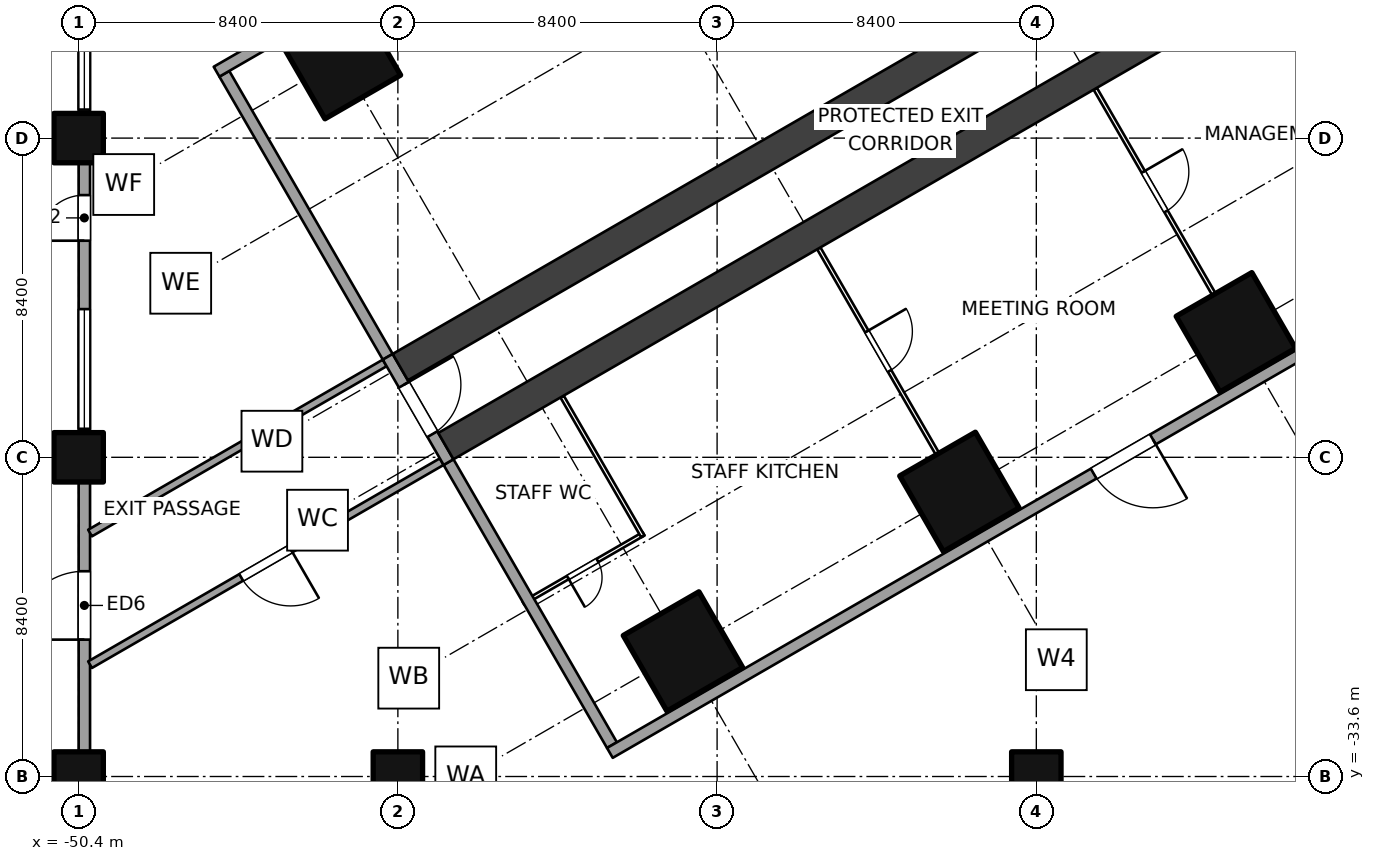
"""IFC4 building model, lengths in metres.
Left out: names, types, materials, properties, quantities, classifications, styles, units other than length and angle.
Written with IfcOpenShell. Run it as: python <this file> out.ifc"""

import sys

from ifc_helpers import new_model, si_unit, direction, frame, frame_2d, origin, origin_2d, place, context, subcontext, project, spatial, rectangle, extrude, element, fill, save


model = new_model("IFC4")
c1 = context("Model", 3, precision=1e-05, world=origin(), true_north=direction((0.0, 1.0)))
c2 = subcontext(c1, "Body", "Model", "MODEL_VIEW")
j1 = project(units=[si_unit("LENGTHUNIT", "METRE"), si_unit("PLANEANGLEUNIT", "RADIAN")], contexts=[c1])
p1 = place(None, origin())
s1 = spatial("IfcSite", under=j1, at=p1, CompositionType="ELEMENT")
p2 = place(p1, origin())
s2 = spatial("IfcBuilding", under=s1, at=p2, CompositionType="ELEMENT")
p3 = place(p2, origin())
s3 = spatial("IfcBuildingStorey", under=s2, at=p3, CompositionType="ELEMENT", Elevation=0.0)
for number, where, z_axis, x_axis in (
    (1, (-19.949, -21.91, 0.0), (0.0, 0.0, 1.0), (-0.5, 0.866, 0.0)),
    (2, (-27.224, -26.11, 0.0), (0.0, 0.0, 1.0), (-0.5, 0.866, 0.0)),
    (3, (-34.499, -30.31, 0.0), (0.0, 0.0, 1.0), (-0.5, 0.866, 0.0)),
    (4, (-43.499, -14.721, 0.0), (0.0, 0.0, 1.0), (-0.5, 0.866, 0.0)),
):
    element("IfcColumn", number, at=place(p3, frame(where, z_axis=z_axis, x_axis=x_axis)), inside=s3, PredefinedType="COLUMN", context=c2, shape_type="SweptSolid", body=[
        extrude(rectangle(XDim=2.3, YDim=2.3, at=origin_2d()), origin(), (0.0, 0.0, 1.0), 6.0),
    ])
for number, where, z_axis, x_axis in (
    (5, (-50.4, -33.6, 0.0), (0.0, 0.0, 1.0), (1.0, 0.0, 0.0)),
    (6, (-50.4, -25.2, 0.0), (0.0, 0.0, 1.0), (1.0, 0.0, 0.0)),
    (7, (-50.4, -16.8, 0.0), (0.0, 0.0, 1.0), (1.0, 0.0, 0.0)),
    (8, (-42.0, -33.6, 0.0), (0.0, 0.0, 1.0), (1.0, 0.0, 0.0)),
    (9, (-25.2, -33.6, 0.0), (0.0, 0.0, 1.0), (1.0, 0.0, 0.0)),
):
    element("IfcColumn", number, at=place(p3, frame(where, z_axis=z_axis, x_axis=x_axis)), inside=s3, PredefinedType="COLUMN", context=c2, shape_type="SweptSolid", body=[
        extrude(rectangle(XDim=1.3, YDim=1.3, at=origin_2d()), origin(), (0.0, 0.0, 1.0), 6.0),
    ])
p4 = place(p3, frame((-8.91, -6.53, 0.0), z_axis=(0.0, 0.0, 1.0), x_axis=(-0.866025284237, -0.500000207062, 0.0)))
e10 = element("IfcWall", 10, at=p4, inside=s3, PredefinedType="SHEAR", context=c2, shape_type="SweptSolid", body=[
    extrude(rectangle(XDim=36.75, YDim=0.8, at=frame_2d((18.375, 0.0))), origin(), (0.0, 0.0, 1.0), 6.0),
])
p5 = place(p4, frame((2.85, 0.0, 0.0)))
e11 = element("IfcOpeningElement", 11, at=p5, cuts=e10, PredefinedType="OPENING", context=c2, shape_type="SweptSolid", body=[
    extrude(rectangle(XDim=1.2, YDim=2.1, at=frame_2d((0.6, 1.05))), frame((0.0, 0.41, 0.0), z_axis=(0.0, -1.0, 0.0), x_axis=(1.0, 0.0, 0.0)), (0.0, 0.0, 1.0), 0.82),
])
p6 = place(p3, frame((-10.11, -4.451, 0.0), z_axis=(0.0, 0.0, 1.0), x_axis=(-0.866025284237, -0.500000207062, 0.0)))
e12 = element("IfcWall", 12, at=p6, inside=s3, PredefinedType="SHEAR", context=c2, shape_type="SweptSolid", body=[
    extrude(rectangle(XDim=36.75, YDim=0.8, at=frame_2d((18.375, 0.0))), origin(), (0.0, 0.0, 1.0), 6.0),
])
p7 = place(p6, frame((10.0, 0.0, 0.0)))
e13 = element("IfcOpeningElement", 13, at=p7, cuts=e12, PredefinedType="OPENING", context=c2, shape_type="SweptSolid", body=[
    extrude(rectangle(XDim=1.0, YDim=2.1, at=frame_2d((0.5, 1.05))), frame((0.0, 0.41, 0.0), z_axis=(0.0, -1.0, 0.0), x_axis=(1.0, 0.0, 0.0)), (0.0, 0.0, 1.0), 0.82),
])
p8 = place(p6, frame((2.85, 0.0, 0.0)))
e14 = element("IfcOpeningElement", 14, at=p8, cuts=e12, PredefinedType="OPENING", context=c2, shape_type="SweptSolid", body=[
    extrude(rectangle(XDim=1.2, YDim=2.1, at=frame_2d((0.6, 1.05))), frame((0.0, 0.41, 0.0), z_axis=(0.0, -1.0, 0.0), x_axis=(1.0, 0.0, 0.0)), (0.0, 0.0, 1.0), 0.82),
])
p9 = place(p3, frame((-50.25, -41.7, 0.0), z_axis=(0.0, 0.0, 1.0), x_axis=(0.0, 1.0, 0.0)))
e15 = element("IfcWall", 15, at=p9, inside=s3, PredefinedType="SOLIDWALL", context=c2, shape_type="SweptSolid", body=[
    extrude(rectangle(XDim=91.8, YDim=0.3, at=frame_2d((45.9, 0.0))), origin(), (0.0, 0.0, 1.0), 4.7),
])
p10 = place(p9, frame((11.702, 0.0, 0.0)))
e16 = element("IfcOpeningElement", 16, at=p10, cuts=e15, PredefinedType="OPENING", context=c2, shape_type="SweptSolid", body=[
    extrude(rectangle(XDim=1.8, YDim=2.4, at=frame_2d((0.9, 1.2))), frame((0.0, 0.16, 0.0), z_axis=(0.0, -1.0, 0.0), x_axis=(1.0, 0.0, 0.0)), (0.0, 0.0, 1.0), 0.32),
])
p11 = place(p9, frame((22.2, 0.0, 0.0)))
e17 = element("IfcOpeningElement", 17, at=p11, cuts=e15, PredefinedType="OPENING", context=c2, shape_type="SweptSolid", body=[
    extrude(rectangle(XDim=1.2, YDim=2.4, at=frame_2d((0.6, 1.2))), frame((0.0, 0.16, 0.0), z_axis=(0.0, -1.0, 0.0), x_axis=(1.0, 0.0, 0.0)), (0.0, 0.0, 1.0), 0.32),
])
p12 = place(p9, frame((36.6, 0.0, 0.0)))
e18 = element("IfcOpeningElement", 18, at=p12, cuts=e15, PredefinedType="OPENING", context=c2, shape_type="SweptSolid", body=[
    extrude(rectangle(XDim=1.8, YDim=2.4, at=frame_2d((0.9, 1.2))), frame((0.0, 0.16, 0.0), z_axis=(0.0, -1.0, 0.0), x_axis=(1.0, 0.0, 0.0)), (0.0, 0.0, 1.0), 0.32),
])
p13 = place(p9, frame((45.0, 0.0, 0.0)))
e19 = element("IfcOpeningElement", 19, at=p13, cuts=e15, PredefinedType="OPENING", context=c2, shape_type="SweptSolid", body=[
    extrude(rectangle(XDim=1.8, YDim=2.4, at=frame_2d((0.9, 1.2))), frame((0.0, 0.16, 0.0), z_axis=(0.0, -1.0, 0.0), x_axis=(1.0, 0.0, 0.0)), (0.0, 0.0, 1.0), 0.32),
])
p14 = place(p9, frame((53.4, 0.0, 0.0)))
e20 = element("IfcOpeningElement", 20, at=p14, cuts=e15, PredefinedType="OPENING", context=c2, shape_type="SweptSolid", body=[
    extrude(rectangle(XDim=1.8, YDim=2.4, at=frame_2d((0.9, 1.2))), frame((0.0, 0.16, 0.0), z_axis=(0.0, -1.0, 0.0), x_axis=(1.0, 0.0, 0.0)), (0.0, 0.0, 1.0), 0.32),
])
p15 = place(p9, frame((70.2, 0.0, 0.0)))
e21 = element("IfcOpeningElement", 21, at=p15, cuts=e15, PredefinedType="OPENING", context=c2, shape_type="SweptSolid", body=[
    extrude(rectangle(XDim=1.8, YDim=2.4, at=frame_2d((0.9, 1.2))), frame((0.0, 0.16, 0.0), z_axis=(0.0, -1.0, 0.0), x_axis=(1.0, 0.0, 0.0)), (0.0, 0.0, 1.0), 0.32),
])
p16 = place(p9, frame((78.6, 0.0, 0.0)))
e22 = element("IfcOpeningElement", 22, at=p16, cuts=e15, PredefinedType="OPENING", context=c2, shape_type="SweptSolid", body=[
    extrude(rectangle(XDim=1.8, YDim=2.4, at=frame_2d((0.9, 1.2))), frame((0.0, 0.16, 0.0), z_axis=(0.0, -1.0, 0.0), x_axis=(1.0, 0.0, 0.0)), (0.0, 0.0, 1.0), 0.32),
])
p17 = place(p9, frame((0.45, 0.0, 0.3)))
e23 = element("IfcOpeningElement", 23, at=p17, cuts=e15, PredefinedType="OPENING", context=c2, shape_type="SweptSolid", body=[
    extrude(rectangle(XDim=3.15, YDim=3.0, at=frame_2d((1.575, 1.5))), frame((0.0, 0.16, 0.0), z_axis=(0.0, -1.0, 0.0), x_axis=(1.0, 0.0, 0.0)), (0.0, 0.0, 1.0), 0.32),
])
p18 = place(p9, frame((4.2, 0.0, 0.3)))
e24 = element("IfcOpeningElement", 24, at=p18, cuts=e15, PredefinedType="OPENING", context=c2, shape_type="SweptSolid", body=[
    extrude(rectangle(XDim=3.15, YDim=3.0, at=frame_2d((1.575, 1.5))), frame((0.0, 0.16, 0.0), z_axis=(0.0, -1.0, 0.0), x_axis=(1.0, 0.0, 0.0)), (0.0, 0.0, 1.0), 0.32),
])
p19 = place(p9, frame((17.25, 0.0, 0.3)))
e25 = element("IfcOpeningElement", 25, at=p19, cuts=e15, PredefinedType="OPENING", context=c2, shape_type="SweptSolid", body=[
    extrude(rectangle(XDim=3.15, YDim=3.0, at=frame_2d((1.575, 1.5))), frame((0.0, 0.16, 0.0), z_axis=(0.0, -1.0, 0.0), x_axis=(1.0, 0.0, 0.0)), (0.0, 0.0, 1.0), 0.32),
])
p20 = place(p9, frame((25.65, 0.0, 0.3)))
e26 = element("IfcOpeningElement", 26, at=p20, cuts=e15, PredefinedType="OPENING", context=c2, shape_type="SweptSolid", body=[
    extrude(rectangle(XDim=3.15, YDim=3.0, at=frame_2d((1.575, 1.5))), frame((0.0, 0.16, 0.0), z_axis=(0.0, -1.0, 0.0), x_axis=(1.0, 0.0, 0.0)), (0.0, 0.0, 1.0), 0.32),
])
p21 = place(p9, frame((29.4, 0.0, 0.3)))
e27 = element("IfcOpeningElement", 27, at=p21, cuts=e15, PredefinedType="OPENING", context=c2, shape_type="SweptSolid", body=[
    extrude(rectangle(XDim=3.15, YDim=3.0, at=frame_2d((1.575, 1.5))), frame((0.0, 0.16, 0.0), z_axis=(0.0, -1.0, 0.0), x_axis=(1.0, 0.0, 0.0)), (0.0, 0.0, 1.0), 0.32),
])
p22 = place(p9, frame((59.25, 0.0, 0.3)))
e28 = element("IfcOpeningElement", 28, at=p22, cuts=e15, PredefinedType="OPENING", context=c2, shape_type="SweptSolid", body=[
    extrude(rectangle(XDim=3.15, YDim=3.0, at=frame_2d((1.575, 1.5))), frame((0.0, 0.16, 0.0), z_axis=(0.0, -1.0, 0.0), x_axis=(1.0, 0.0, 0.0)), (0.0, 0.0, 1.0), 0.32),
])
p23 = place(p9, frame((63.0, 0.0, 0.3)))
e29 = element("IfcOpeningElement", 29, at=p23, cuts=e15, PredefinedType="OPENING", context=c2, shape_type="SweptSolid", body=[
    extrude(rectangle(XDim=3.15, YDim=3.0, at=frame_2d((1.575, 1.5))), frame((0.0, 0.16, 0.0), z_axis=(0.0, -1.0, 0.0), x_axis=(1.0, 0.0, 0.0)), (0.0, 0.0, 1.0), 0.32),
])
p24 = place(p9, frame((84.45, 0.0, 0.3)))
e30 = element("IfcOpeningElement", 30, at=p24, cuts=e15, PredefinedType="OPENING", context=c2, shape_type="SweptSolid", body=[
    extrude(rectangle(XDim=3.15, YDim=3.0, at=frame_2d((1.575, 1.5))), frame((0.0, 0.16, 0.0), z_axis=(0.0, -1.0, 0.0), x_axis=(1.0, 0.0, 0.0)), (0.0, 0.0, 1.0), 0.32),
])
p25 = place(p9, frame((88.2, 0.0, 0.3)))
e31 = element("IfcOpeningElement", 31, at=p25, cuts=e15, PredefinedType="OPENING", context=c2, shape_type="SweptSolid", body=[
    extrude(rectangle(XDim=3.15, YDim=3.0, at=frame_2d((1.575, 1.5))), frame((0.0, 0.16, 0.0), z_axis=(0.0, -1.0, 0.0), x_axis=(1.0, 0.0, 0.0)), (0.0, 0.0, 1.0), 0.32),
])
p26 = place(p3, frame((-23.649, -15.501, 0.0), z_axis=(0.0, 0.0, 1.0), x_axis=(0.500004234368, -0.866022959057, 0.0)))
e32 = element("IfcWall", 32, at=p26, inside=s3, PredefinedType="PARTITIONING", context=c2, shape_type="SweptSolid", body=[
    extrude(rectangle(XDim=6.25, YDim=0.1, at=frame_2d((3.125, 0.0))), origin(), (0.0, 0.0, 1.0), 3.9),
])
p27 = place(p26, frame((2.525, 0.0, 0.0)))
e33 = element("IfcOpeningElement", 33, at=p27, cuts=e32, PredefinedType="OPENING", context=c2, shape_type="SweptSolid", body=[
    extrude(rectangle(XDim=1.2, YDim=2.1, at=frame_2d((0.6, 1.05))), frame((0.0, 0.06, 0.0), z_axis=(0.0, -1.0, 0.0), x_axis=(1.0, 0.0, 0.0)), (0.0, 0.0, 1.0), 0.12),
])
p28 = place(p3, frame((-30.924, -19.701, 0.0), z_axis=(0.0, 0.0, 1.0), x_axis=(0.500004234368, -0.866022959057, 0.0)))
e34 = element("IfcWall", 34, at=p28, inside=s3, PredefinedType="PARTITIONING", context=c2, shape_type="SweptSolid", body=[
    extrude(rectangle(XDim=6.25, YDim=0.1, at=frame_2d((3.125, 0.0))), origin(), (0.0, 0.0, 1.0), 3.9),
])
p29 = place(p28, frame((2.525, 0.0, 0.0)))
e35 = element("IfcOpeningElement", 35, at=p29, cuts=e34, PredefinedType="OPENING", context=c2, shape_type="SweptSolid", body=[
    extrude(rectangle(XDim=1.2, YDim=2.1, at=frame_2d((0.6, 1.05))), frame((0.0, 0.06, 0.0), z_axis=(0.0, -1.0, 0.0), x_axis=(1.0, 0.0, 0.0)), (0.0, 0.0, 1.0), 0.12),
])
p30 = place(p3, frame((-35.536, -27.214, 0.0), z_axis=(0.0, 0.0, 1.0), x_axis=(-0.865995104784, -0.500052475737, 0.0)))
e36 = element("IfcWall", 36, at=p30, inside=s3, PredefinedType="PARTITIONING", context=c2, shape_type="SweptSolid", body=[
    extrude(rectangle(XDim=3.65, YDim=0.1, at=frame_2d((1.825, 0.0))), origin(), (0.0, 0.0, 1.0), 5.7),
])
p31 = place(p30, frame((1.4, 0.0, 0.0)))
e37 = element("IfcOpeningElement", 37, at=p31, cuts=e36, PredefinedType="OPENING", context=c2, shape_type="SweptSolid", body=[
    extrude(rectangle(XDim=0.9, YDim=2.1, at=frame_2d((0.45, 1.05))), frame((0.0, 0.06, 0.0), z_axis=(0.0, -1.0, 0.0), x_axis=(1.0, 0.0, 0.0)), (0.0, 0.0, 1.0), 0.12),
])
p32 = place(p3, frame((-37.679, -23.601, 0.0), z_axis=(0.0, 0.0, 1.0), x_axis=(0.499994284652, -0.866028703517, 0.0)))
e38 = element("IfcWall", 38, at=p32, inside=s3, PredefinedType="PARTITIONING", context=c2, shape_type="SweptSolid", body=[
    extrude(rectangle(XDim=4.25, YDim=0.1, at=frame_2d((2.125, 0.0))), origin(), (0.0, 0.0, 1.0), 3.9),
])
p33 = place(p3, frame((-42.267, -22.555, 0.0), z_axis=(0.0, 0.0, 1.0), x_axis=(0.499971222258, -0.866042017984, 0.0)))
e39 = element("IfcWall", 39, at=p33, inside=s3, PredefinedType="SOLIDWALL", context=c2, shape_type="SweptSolid", body=[
    extrude(rectangle(XDim=3.2, YDim=0.3, at=frame_2d((1.6, 0.0))), origin(), (0.0, 0.0, 1.0), 5.7),
])
p34 = place(p33, frame((0.85, 0.0, 0.0)))
e40 = element("IfcOpeningElement", 40, at=p34, cuts=e39, PredefinedType="OPENING", context=c2, shape_type="SweptSolid", body=[
    extrude(rectangle(XDim=1.5, YDim=2.1, at=frame_2d((0.75, 1.05))), frame((0.0, 0.16, 0.0), z_axis=(0.0, -1.0, 0.0), x_axis=(1.0, 0.0, 0.0)), (0.0, 0.0, 1.0), 0.32),
])
p35 = place(p3, frame((-40.846, -25.315, 0.0), z_axis=(0.0, 0.0, 1.0), x_axis=(-0.866028443642, -0.499994734776, 0.0)))
e41 = element("IfcWall", 41, at=p35, inside=s3, PredefinedType="SOLIDWALL", context=c2, shape_type="SweptSolid", body=[
    extrude(rectangle(XDim=10.685, YDim=0.2, at=frame_2d((5.343, 0.0))), origin(), (0.0, 0.0, 1.0), 5.7),
])
p36 = place(p35, frame((4.593, 0.0, 0.0)))
e42 = element("IfcOpeningElement", 42, at=p36, cuts=e41, PredefinedType="OPENING", context=c2, shape_type="SweptSolid", body=[
    extrude(rectangle(XDim=1.5, YDim=2.1, at=frame_2d((0.75, 1.05))), frame((0.0, 0.11, 0.0), z_axis=(0.0, -1.0, 0.0), x_axis=(1.0, 0.0, 0.0)), (0.0, 0.0, 1.0), 0.22),
])
p37 = place(p3, frame((-42.346, -22.717, 0.0), z_axis=(0.0, 0.0, 1.0), x_axis=(-0.866038004836, -0.499978173704, 0.0)))
e43 = element("IfcWall", 43, at=p37, inside=s3, PredefinedType="SOLIDWALL", context=c2, shape_type="SweptSolid", body=[
    extrude(rectangle(XDim=8.953, YDim=0.2, at=frame_2d((4.477, 0.0))), origin(), (0.0, 0.0, 1.0), 5.7),
])
for number, where, z_axis, x_axis in (
    (44, (-40.667, -25.326, 0.0), (0.0, 0.0, 1.0), (0.5, -0.866, 0.0)),
    (45, (-42.267, -22.555, 0.0), (0.0, 0.0, 1.0), (-0.5, 0.866, 0.0)),
):
    element("IfcWall", number, at=place(p3, frame(where, z_axis=z_axis, x_axis=x_axis)), inside=s3, PredefinedType="SOLIDWALL", context=c2, shape_type="SweptSolid", body=[
        extrude(rectangle(XDim=8.6, YDim=0.3, at=frame_2d((4.3, 0.0))), origin(), (0.0, 0.0, 1.0), 4.1),
    ])
p38 = place(p3, frame((-0.15, -12.038, 0.0), z_axis=(0.0, 0.0, 1.0), x_axis=(-0.866026292622, -0.499998460486, 0.0)))
e46 = element("IfcWall", 46, at=p38, inside=s3, PredefinedType="SOLIDWALL", context=c2, shape_type="SweptSolid", body=[
    extrude(rectangle(XDim=41.883, YDim=0.3, at=frame_2d((20.941, 0.0))), origin(), (0.0, 0.0, 1.0), 5.7),
])
p39 = place(p38, frame((25.383, 0.0, 0.0)))
e47 = element("IfcOpeningElement", 47, at=p39, cuts=e46, PredefinedType="OPENING", context=c2, shape_type="SweptSolid", body=[
    extrude(rectangle(XDim=1.8, YDim=2.4, at=frame_2d((0.9, 1.2))), frame((0.0, 0.16, 0.0), z_axis=(0.0, -1.0, 0.0), x_axis=(1.0, 0.0, 0.0)), (0.0, 0.0, 1.0), 0.32),
])
p40 = place(p3, frame((-9.45, 6.495, 0.0), z_axis=(0.0, 0.0, 1.0), x_axis=(-0.866025301493, -0.500000177174, 0.0)))
e48 = element("IfcWall", 48, at=p40, inside=s3, PredefinedType="SOLIDWALL", context=c2, shape_type="SweptSolid", body=[
    extrude(rectangle(XDim=43.095, YDim=0.3, at=frame_2d((21.548, 0.0))), origin(), (0.0, 0.0, 1.0), 5.7),
])
p41 = place(p40, frame((26.595, 0.0, 0.0)))
e49 = element("IfcOpeningElement", 49, at=p41, cuts=e48, PredefinedType="OPENING", context=c2, shape_type="SweptSolid", body=[
    extrude(rectangle(XDim=1.8, YDim=2.4, at=frame_2d((0.9, 1.2))), frame((0.0, 0.16, 0.0), z_axis=(0.0, -1.0, 0.0), x_axis=(1.0, 0.0, 0.0)), (0.0, 0.0, 1.0), 0.32),
])
p42 = place(p10, origin())
e50 = element("IfcDoor", 50, at=p42, inside=s3, OperationType="DOUBLE_DOOR_DOUBLE_SWING", PredefinedType="DOOR", context=c2, shape_type="SweptSolid", body=[
    extrude(rectangle(XDim=1.8, YDim=2.4, at=frame_2d((0.9, 1.2))), frame((0.0, 0.025, 0.0), z_axis=(0.0, -1.0, 0.0), x_axis=(1.0, 0.0, 0.0)), (0.0, 0.0, 1.0), 0.05),
])
fill(e16, e50)
p43 = place(p11, origin())
e51 = element("IfcDoor", 51, at=p43, inside=s3, OperationType="SINGLE_SWING_LEFT", PredefinedType="DOOR", context=c2, shape_type="SweptSolid", body=[
    extrude(rectangle(XDim=1.2, YDim=2.4, at=frame_2d((0.6, 1.2))), frame((0.0, 0.025, 0.0), z_axis=(0.0, -1.0, 0.0), x_axis=(1.0, 0.0, 0.0)), (0.0, 0.0, 1.0), 0.05),
])
fill(e17, e51)
p44 = place(p19, origin())
e52 = element("IfcWindow", 52, at=p44, inside=s3, PartitioningType="SINGLE_PANEL", PredefinedType="WINDOW", context=c2, shape_type="SweptSolid", body=[
    extrude(rectangle(XDim=3.15, YDim=3.0, at=frame_2d((1.575, 1.5))), frame((0.0, 0.03, 0.0), z_axis=(0.0, -1.0, 0.0), x_axis=(1.0, 0.0, 0.0)), (0.0, 0.0, 1.0), 0.06),
])
fill(e25, e52)
p45 = place(p20, origin())
e53 = element("IfcWindow", 53, at=p45, inside=s3, PartitioningType="SINGLE_PANEL", PredefinedType="WINDOW", context=c2, shape_type="SweptSolid", body=[
    extrude(rectangle(XDim=3.15, YDim=3.0, at=frame_2d((1.575, 1.5))), frame((0.0, 0.03, 0.0), z_axis=(0.0, -1.0, 0.0), x_axis=(1.0, 0.0, 0.0)), (0.0, 0.0, 1.0), 0.06),
])
fill(e26, e53)
p46 = place(p27, origin())
e54 = element("IfcDoor", 54, at=p46, inside=s3, OperationType="DOUBLE_SWING_LEFT", PredefinedType="DOOR", context=c2, shape_type="SweptSolid", body=[
    extrude(rectangle(XDim=1.2, YDim=2.1, at=frame_2d((0.6, 1.05))), frame((0.0, 0.025, 0.0), z_axis=(0.0, -1.0, 0.0), x_axis=(1.0, 0.0, 0.0)), (0.0, 0.0, 1.0), 0.05),
])
fill(e33, e54)
p47 = place(p29, origin())
e55 = element("IfcDoor", 55, at=p47, inside=s3, OperationType="DOUBLE_SWING_LEFT", PredefinedType="DOOR", context=c2, shape_type="SweptSolid", body=[
    extrude(rectangle(XDim=1.2, YDim=2.1, at=frame_2d((0.6, 1.05))), frame((0.0, 0.025, 0.0), z_axis=(0.0, -1.0, 0.0), x_axis=(1.0, 0.0, 0.0)), (0.0, 0.0, 1.0), 0.05),
])
fill(e35, e55)
p48 = place(p31, origin())
e56 = element("IfcDoor", 56, at=p48, inside=s3, OperationType="SINGLE_SWING_RIGHT", PredefinedType="DOOR", context=c2, shape_type="SweptSolid", body=[
    extrude(rectangle(XDim=0.9, YDim=2.1, at=frame_2d((0.45, 1.05))), frame((0.0, 0.025, 0.0), z_axis=(0.0, -1.0, 0.0), x_axis=(1.0, 0.0, 0.0)), (0.0, 0.0, 1.0), 0.05),
])
fill(e37, e56)
p49 = place(p34, origin())
e57 = element("IfcDoor", 57, at=p49, inside=s3, OperationType="DOUBLE_DOOR_DOUBLE_SWING", PredefinedType="DOOR", context=c2, shape_type="SweptSolid", body=[
    extrude(rectangle(XDim=1.5, YDim=2.1, at=frame_2d((0.75, 1.05))), frame((0.0, 0.025, 0.0), z_axis=(0.0, -1.0, 0.0), x_axis=(1.0, 0.0, 0.0)), (0.0, 0.0, 1.0), 0.05),
])
fill(e40, e57)
p50 = place(p36, origin())
e58 = element("IfcDoor", 58, at=p50, inside=s3, OperationType="DOUBLE_DOOR_DOUBLE_SWING", PredefinedType="DOOR", context=c2, shape_type="SweptSolid", body=[
    extrude(rectangle(XDim=1.5, YDim=2.1, at=frame_2d((0.75, 1.05))), frame((0.0, 0.025, 0.0), z_axis=(0.0, -1.0, 0.0), x_axis=(1.0, 0.0, 0.0)), (0.0, 0.0, 1.0), 0.05),
])
fill(e42, e58)
p51 = place(p39, origin())
e59 = element("IfcDoor", 59, at=p51, inside=s3, OperationType="DOUBLE_DOOR_DOUBLE_SWING", PredefinedType="DOOR", context=c2, shape_type="SweptSolid", body=[
    extrude(rectangle(XDim=1.8, YDim=2.4, at=frame_2d((0.9, 1.2))), frame((0.0, 0.025, 0.0), z_axis=(0.0, -1.0, 0.0), x_axis=(1.0, 0.0, 0.0)), (0.0, 0.0, 1.0), 0.05),
])
fill(e47, e59)
save(model, sys.argv[1])
